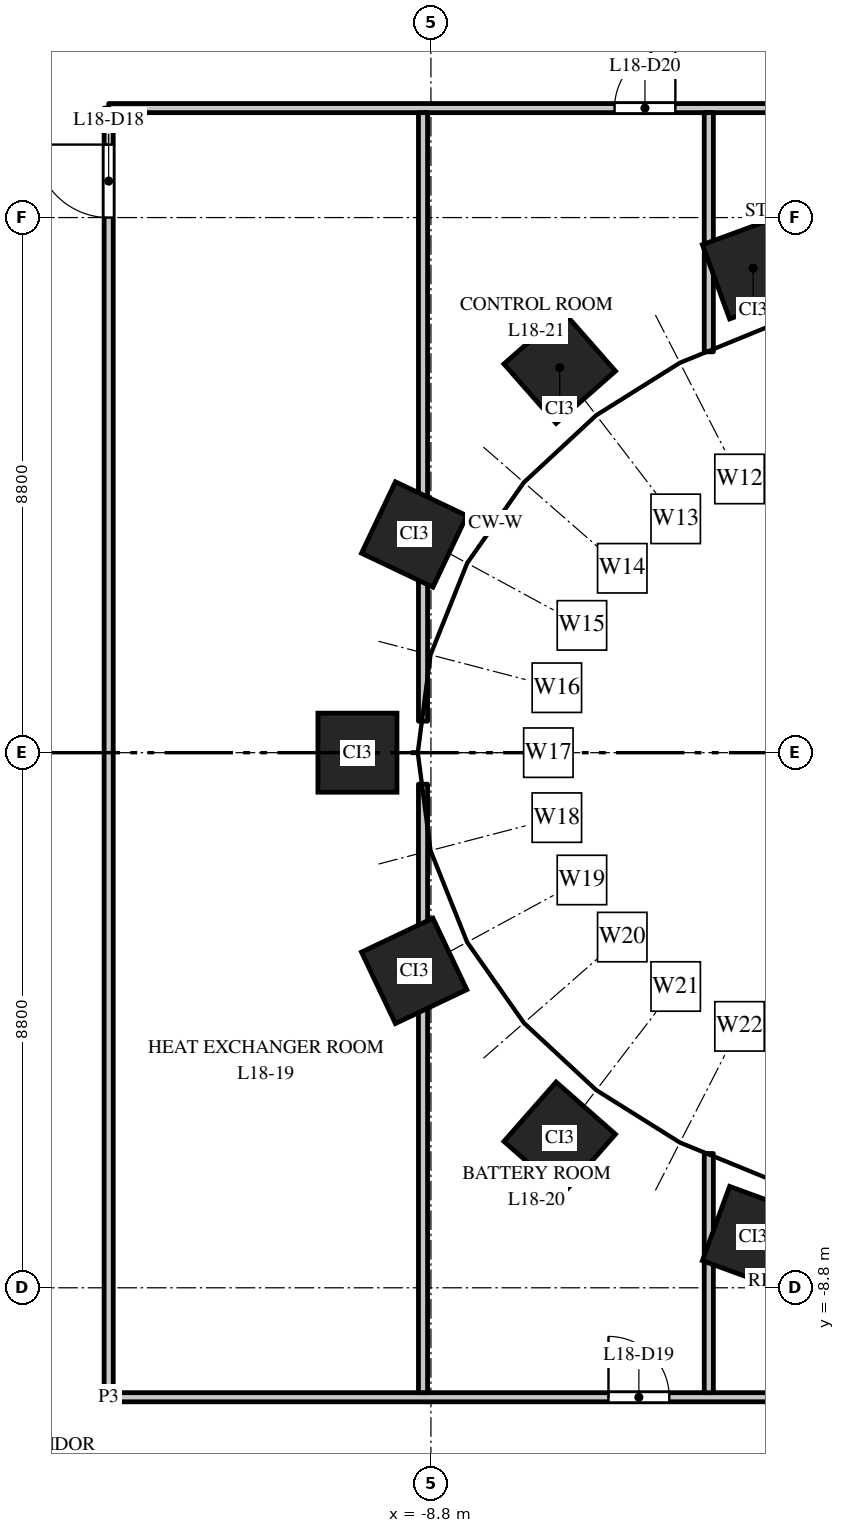
"""IFC4 building model, lengths in metres.
Left out: names, types, materials, properties, quantities, classifications, styles, units other than length and angle.
Written with IfcOpenShell. Run it as: python <this file> out.ifc"""

import sys

from ifc_helpers import new_model, si_unit, direction, frame, frame_2d, origin, origin_2d, place, context, subcontext, project, spatial, rectangle, extrude, element, fill, save


model = new_model("IFC4")
c1 = context("Model", 3, precision=1e-05, world=origin(), true_north=direction((0.0, 1.0)))
c2 = subcontext(c1, "Body", "Model", "MODEL_VIEW")
j1 = project(units=[si_unit("LENGTHUNIT", "METRE"), si_unit("PLANEANGLEUNIT", "RADIAN")], contexts=[c1])
p1 = place(None, origin())
s1 = spatial("IfcSite", under=j1, at=p1, CompositionType="ELEMENT")
p2 = place(p1, origin())
s2 = spatial("IfcBuilding", under=s1, at=p2, CompositionType="ELEMENT")
p3 = place(p2, frame((0.0, 0.0, 82.5)))
s3 = spatial("IfcBuildingStorey", under=s2, at=p3, CompositionType="ELEMENT", Elevation=82.5)
for number, where, z_axis, x_axis in (
    (1, (-3.501, 7.967, 0.0), (0.0, 0.0, 1.0), (-0.939, -0.344, 0.0)),
    (2, (-6.682, 6.334, 0.0), (0.0, 0.0, 1.0), (-0.751, -0.66, 0.0)),
    (3, (-9.076, 3.588, 0.0), (0.0, 0.0, 1.0), (-0.429, -0.903, 0.0)),
    (4, (-10.008, 0.0, 0.0), (0.0, 0.0, 1.0), (0.0, -1.0, 0.0)),
    (5, (-9.076, -3.588, 0.0), (0.0, 0.0, 1.0), (0.429, -0.903, 0.0)),
    (6, (-6.682, -6.334, 0.0), (0.0, 0.0, 1.0), (0.751, -0.66, 0.0)),
    (7, (-3.501, -7.967, 0.0), (0.0, 0.0, 1.0), (0.939, -0.344, 0.0)),
):
    element("IfcColumn", number, at=place(p3, frame(where, z_axis=z_axis, x_axis=x_axis)), inside=s3, PredefinedType="COLUMN", context=c2, shape_type="SweptSolid", body=[
        extrude(rectangle(XDim=1.3, YDim=1.3, at=origin_2d()), origin(), (0.0, 0.0, 1.0), 5.5),
    ])
p4 = place(p3, frame((-14.1, -10.6, 0.0), z_axis=(0.0, 0.0, 1.0), x_axis=(0.0, 1.0, 0.0)))
e8 = element("IfcWall", 8, at=p4, inside=s3, PredefinedType="PARTITIONING", context=c2, shape_type="SweptSolid", body=[
    extrude(rectangle(XDim=21.2, YDim=0.15, at=frame_2d((10.6, 0.0))), origin(), (0.0, 0.0, 1.0), 4.25),
])
p5 = place(p4, frame((19.4, 0.0, 0.0)))
e9 = element("IfcOpeningElement", 9, at=p5, cuts=e8, PredefinedType="OPENING", context=c2, shape_type="SweptSolid", body=[
    extrude(rectangle(XDim=1.2, YDim=2.1, at=frame_2d((0.6, 1.05))), frame((0.0, 0.085, 0.0), z_axis=(0.0, -1.0, 0.0), x_axis=(1.0, 0.0, 0.0)), (0.0, 0.0, 1.0), 0.17),
])
p6 = place(p3, frame((-14.1, -10.6, 0.0), z_axis=(0.0, 0.0, 1.0), x_axis=(1.0, 0.0, 0.0)))
e10 = element("IfcWall", 10, at=p6, inside=s3, PredefinedType="PARTITIONING", context=c2, shape_type="SweptSolid", body=[
    extrude(rectangle(XDim=28.2, YDim=0.15, at=frame_2d((14.1, 0.0))), origin(), (0.0, 0.0, 1.0), 4.35),
])
p7 = place(p6, frame((8.22, 0.0, 0.0)))
e11 = element("IfcOpeningElement", 11, at=p7, cuts=e10, PredefinedType="OPENING", context=c2, shape_type="SweptSolid", body=[
    extrude(rectangle(XDim=1.0, YDim=2.1, at=frame_2d((0.5, 1.05))), frame((0.0, 0.085, 0.0), z_axis=(0.0, -1.0, 0.0), x_axis=(1.0, 0.0, 0.0)), (0.0, 0.0, 1.0), 0.17),
])
p8 = place(p6, frame((12.92, 0.0, 0.0)))
e12 = element("IfcOpeningElement", 12, at=p8, cuts=e10, PredefinedType="OPENING", context=c2, shape_type="SweptSolid", body=[
    extrude(rectangle(XDim=1.0, YDim=2.1, at=frame_2d((0.5, 1.05))), frame((0.0, 0.085, 0.0), z_axis=(0.0, -1.0, 0.0), x_axis=(1.0, 0.0, 0.0)), (0.0, 0.0, 1.0), 0.17),
])
p9 = place(p6, frame((17.62, 0.0, 0.0)))
e13 = element("IfcOpeningElement", 13, at=p9, cuts=e10, PredefinedType="OPENING", context=c2, shape_type="SweptSolid", body=[
    extrude(rectangle(XDim=1.0, YDim=2.1, at=frame_2d((0.5, 1.05))), frame((0.0, 0.085, 0.0), z_axis=(0.0, -1.0, 0.0), x_axis=(1.0, 0.0, 0.0)), (0.0, 0.0, 1.0), 0.17),
])
p10 = place(p3, frame((-14.1, 10.6, 0.0), z_axis=(0.0, 0.0, 1.0), x_axis=(1.0, 0.0, 0.0)))
e14 = element("IfcWall", 14, at=p10, inside=s3, PredefinedType="PARTITIONING", context=c2, shape_type="SweptSolid", body=[
    extrude(rectangle(XDim=28.2, YDim=0.15, at=frame_2d((14.1, 0.0))), origin(), (0.0, 0.0, 1.0), 4.35),
])
p11 = place(p10, frame((8.32, 0.0, 0.0)))
e15 = element("IfcOpeningElement", 15, at=p11, cuts=e14, PredefinedType="OPENING", context=c2, shape_type="SweptSolid", body=[
    extrude(rectangle(XDim=1.0, YDim=2.1, at=frame_2d((0.5, 1.05))), frame((0.0, 0.085, 0.0), z_axis=(0.0, -1.0, 0.0), x_axis=(1.0, 0.0, 0.0)), (0.0, 0.0, 1.0), 0.17),
])
p12 = place(p10, frame((13.02, 0.0, 0.0)))
e16 = element("IfcOpeningElement", 16, at=p12, cuts=e14, PredefinedType="OPENING", context=c2, shape_type="SweptSolid", body=[
    extrude(rectangle(XDim=1.0, YDim=2.1, at=frame_2d((0.5, 1.05))), frame((0.0, 0.085, 0.0), z_axis=(0.0, -1.0, 0.0), x_axis=(1.0, 0.0, 0.0)), (0.0, 0.0, 1.0), 0.17),
])
p13 = place(p10, frame((17.72, 0.0, 0.0)))
e17 = element("IfcOpeningElement", 17, at=p13, cuts=e14, PredefinedType="OPENING", context=c2, shape_type="SweptSolid", body=[
    extrude(rectangle(XDim=1.0, YDim=2.1, at=frame_2d((0.5, 1.05))), frame((0.0, 0.085, 0.0), z_axis=(0.0, -1.0, 0.0), x_axis=(1.0, 0.0, 0.0)), (0.0, 0.0, 1.0), 0.17),
])
p14 = place(p10, frame((19.92, 0.0, 0.0)))
e18 = element("IfcOpeningElement", 18, at=p14, cuts=e14, PredefinedType="OPENING", context=c2, shape_type="SweptSolid", body=[
    extrude(rectangle(XDim=1.2, YDim=2.1, at=frame_2d((0.6, 1.05))), frame((0.0, 0.085, 0.0), z_axis=(0.0, -1.0, 0.0), x_axis=(1.0, 0.0, 0.0)), (0.0, 0.0, 1.0), 0.17),
])
for number, where, z_axis, x_axis in (
    (19, (-8.93, -10.525, 0.0), (0.0, 0.0, 1.0), (0.0, 1.0, 0.0)),
    (20, (-8.93, 0.518, 0.0), (0.0, 0.0, 1.0), (0.0, 1.0, 0.0)),
):
    element("IfcWall", number, at=place(p3, frame(where, z_axis=z_axis, x_axis=x_axis)), inside=s3, PredefinedType="PARTITIONING", context=c2, shape_type="SweptSolid", body=[
        extrude(rectangle(XDim=10.007, YDim=0.15, at=frame_2d((5.003, 0.0))), origin(), (0.0, 0.0, 1.0), 4.25),
    ])
for number, where, z_axis, x_axis in (
    (21, (-4.23, -10.525, 0.0), (0.0, 0.0, 1.0), (0.0, 1.0, 0.0)),
    (22, (-4.23, 6.592, 0.0), (0.0, 0.0, 1.0), (0.0, 1.0, 0.0)),
):
    element("IfcWall", number, at=place(p3, frame(where, z_axis=z_axis, x_axis=x_axis)), inside=s3, PredefinedType="PARTITIONING", context=c2, shape_type="SweptSolid", body=[
        extrude(rectangle(XDim=3.933, YDim=0.15, at=frame_2d((1.966, 0.0))), origin(), (0.0, 0.0, 1.0), 4.35),
    ])
p15 = place(p5, origin())
e23 = element("IfcDoor", 23, at=p15, inside=s3, OperationType="SINGLE_SWING_RIGHT", PredefinedType="DOOR", context=c2, shape_type="SweptSolid", body=[
    extrude(rectangle(XDim=1.2, YDim=2.1, at=frame_2d((0.6, 1.05))), frame((0.0, 0.025, 0.0), z_axis=(0.0, -1.0, 0.0), x_axis=(1.0, 0.0, 0.0)), (0.0, 0.0, 1.0), 0.05),
])
fill(e9, e23)
p16 = place(p7, origin())
e24 = element("IfcDoor", 24, at=p16, inside=s3, OperationType="SINGLE_SWING_LEFT", PredefinedType="DOOR", context=c2, shape_type="SweptSolid", body=[
    extrude(rectangle(XDim=1.0, YDim=2.1, at=frame_2d((0.5, 1.05))), frame((0.0, 0.025, 0.0), z_axis=(0.0, -1.0, 0.0), x_axis=(1.0, 0.0, 0.0)), (0.0, 0.0, 1.0), 0.05),
])
fill(e11, e24)
p17 = place(p11, origin())
e25 = element("IfcDoor", 25, at=p17, inside=s3, OperationType="SINGLE_SWING_RIGHT", PredefinedType="DOOR", context=c2, shape_type="SweptSolid", body=[
    extrude(rectangle(XDim=1.0, YDim=2.1, at=frame_2d((0.5, 1.05))), frame((0.0, 0.025, 0.0), z_axis=(0.0, -1.0, 0.0), x_axis=(1.0, 0.0, 0.0)), (0.0, 0.0, 1.0), 0.05),
])
fill(e15, e25)
save(model, sys.argv[1])
